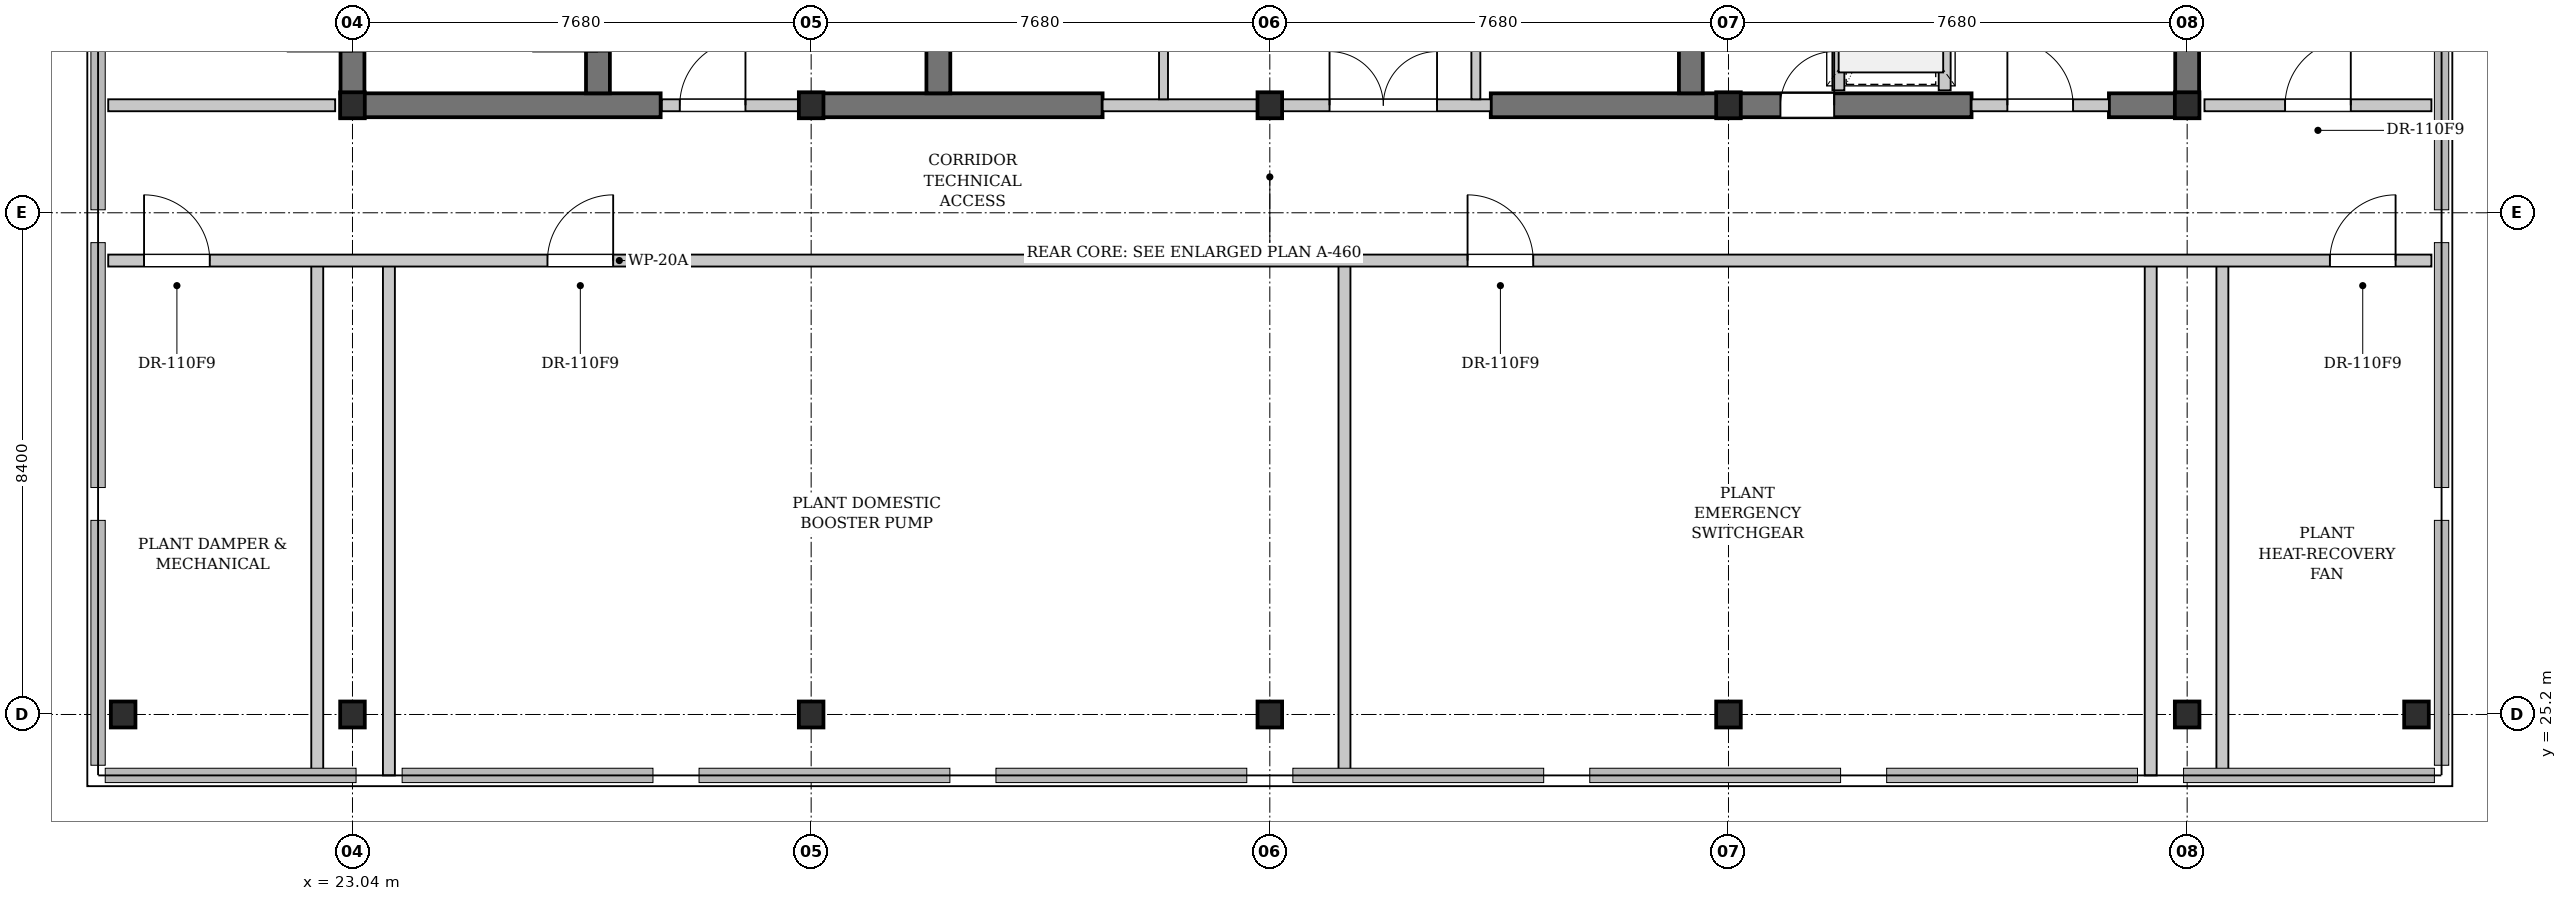
"""IFC4 building model, lengths in metres.
Left out: names, types, materials, properties, quantities, classifications, styles, units other than length and angle.
Written with IfcOpenShell. Run it as: python <this file> out.ifc"""

import sys

from ifc_helpers import new_model, si_unit, direction, frame, frame_2d, origin, origin_2d, place, context, subcontext, project, spatial, rectangle, i_section, extrude, element, fill, save


model = new_model("IFC4")
c1 = context("Model", 3, precision=1e-05, world=origin(), true_north=direction((0.0, 1.0)))
c2 = subcontext(c1, "Body", "Model", "MODEL_VIEW")
j1 = project(units=[si_unit("LENGTHUNIT", "METRE"), si_unit("PLANEANGLEUNIT", "RADIAN")], contexts=[c1])
p1 = place(None, origin())
s1 = spatial("IfcSite", under=j1, at=p1, CompositionType="ELEMENT")
p2 = place(p1, origin())
s2 = spatial("IfcBuilding", under=s1, at=p2, CompositionType="ELEMENT")
p3 = place(p2, frame((0.0, 0.0, 255.2)))
s3 = spatial("IfcBuildingStorey", under=s2, at=p3, CompositionType="ELEMENT", Elevation=255.2)
p4 = place(p3, frame((22.84, 35.4, 0.0), z_axis=(0.0, 0.0, 1.0), x_axis=(1.0, 0.0, 0.0)))
e1 = element("IfcWall", 1, at=p4, inside=s3, PredefinedType="SHEAR", context=c2, shape_type="SweptSolid", body=[
    extrude(rectangle(XDim=5.36, YDim=0.4, at=frame_2d((2.68, 0.0))), origin(), (0.0, 0.0, 1.0), 3.48),
])
p5 = place(p3, frame((30.72, 35.4, 0.0), z_axis=(0.0, 0.0, 1.0), x_axis=(1.0, 0.0, 0.0)))
e2 = element("IfcWall", 2, at=p5, inside=s3, PredefinedType="SHEAR", context=c2, shape_type="SweptSolid", body=[
    extrude(rectangle(XDim=4.88, YDim=0.4, at=frame_2d((2.44, 0.0))), origin(), (0.0, 0.0, 1.0), 3.48),
])
p6 = place(p3, frame((42.1, 35.4, 0.0), z_axis=(0.0, 0.0, 1.0), x_axis=(1.0, 0.0, 0.0)))
e3 = element("IfcWall", 3, at=p6, inside=s3, PredefinedType="SHEAR", context=c2, shape_type="SweptSolid", body=[
    extrude(rectangle(XDim=8.05, YDim=0.4, at=frame_2d((4.025, 0.0))), origin(), (0.0, 0.0, 1.0), 3.48),
])
p7 = place(p6, frame((4.85, 0.0, 0.0)))
e4 = element("IfcOpeningElement", 4, at=p7, cuts=e3, PredefinedType="OPENING", context=c2, shape_type="SweptSolid", body=[
    extrude(rectangle(XDim=0.9, YDim=2.15, at=frame_2d((0.45, 1.075))), frame((0.0, 0.21, 0.0), z_axis=(0.0, -1.0, 0.0), x_axis=(1.0, 0.0, 0.0)), (0.0, 0.0, 1.0), 0.42),
])
p8 = place(p3, frame((52.45, 35.4, 0.0), z_axis=(0.0, 0.0, 1.0), x_axis=(1.0, 0.0, 0.0)))
e5 = element("IfcWall", 5, at=p8, inside=s3, PredefinedType="SHEAR", context=c2, shape_type="SweptSolid", body=[
    extrude(rectangle(XDim=1.51, YDim=0.4, at=frame_2d((0.755, 0.0))), origin(), (0.0, 0.0, 1.0), 3.48),
])
p9 = place(p3, frame((23.04, 35.6, 0.0), z_axis=(0.0, 0.0, 1.0), x_axis=(0.0, 1.0, 0.0)))
e6 = element("IfcWall", 6, at=p9, inside=s3, PredefinedType="SHEAR", context=c2, shape_type="SweptSolid", body=[
    extrude(rectangle(XDim=10.4, YDim=0.4, at=frame_2d((5.2, 0.0))), origin(), (0.0, 0.0, 1.0), 3.48),
])
p10 = place(p9, frame((0.7, 0.0, 0.0)))
e7 = element("IfcOpeningElement", 7, at=p10, cuts=e6, PredefinedType="OPENING", context=c2, shape_type="SweptSolid", body=[
    extrude(rectangle(XDim=1.1, YDim=2.15, at=frame_2d((0.55, 1.075))), frame((0.0, 0.21, 0.0), z_axis=(0.0, -1.0, 0.0), x_axis=(1.0, 0.0, 0.0)), (0.0, 0.0, 1.0), 0.42),
])
p11 = place(p3, frame((27.15, 35.6, 0.0), z_axis=(0.0, 0.0, 1.0), x_axis=(0.0, 1.0, 0.0)))
e8 = element("IfcWall", 8, at=p11, inside=s3, PredefinedType="SHEAR", context=c2, shape_type="SweptSolid", body=[
    extrude(rectangle(XDim=10.4, YDim=0.4, at=frame_2d((5.2, 0.0))), origin(), (0.0, 0.0, 1.0), 3.48),
])
p12 = place(p11, frame((0.7, 0.0, 0.0)))
e9 = element("IfcOpeningElement", 9, at=p12, cuts=e8, PredefinedType="OPENING", context=c2, shape_type="SweptSolid", body=[
    extrude(rectangle(XDim=1.1, YDim=2.15, at=frame_2d((0.55, 1.075))), frame((0.0, 0.21, 0.0), z_axis=(0.0, -1.0, 0.0), x_axis=(1.0, 0.0, 0.0)), (0.0, 0.0, 1.0), 0.42),
])
for number, where, z_axis, x_axis in (
    (10, (32.85, 35.6, 0.0), (0.0, 0.0, 1.0), (0.0, 1.0, 0.0)),
    (11, (45.45, 35.6, 0.0), (0.0, 0.0, 1.0), (0.0, 1.0, 0.0)),
    (12, (53.76, 35.6, 0.0), (0.0, 0.0, 1.0), (0.0, 1.0, 0.0)),
):
    element("IfcWall", number, at=place(p3, frame(where, z_axis=z_axis, x_axis=x_axis)), inside=s3, PredefinedType="SHEAR", context=c2, shape_type="SweptSolid", body=[
        extrude(rectangle(XDim=10.4, YDim=0.4, at=frame_2d((5.2, 0.0))), origin(), (0.0, 0.0, 1.0), 3.48),
    ])
for number, where, z_axis, x_axis in (
    (13, (23.04, 35.4, 0.0), (0.0, 0.0, 1.0), (1.0, 0.0, 0.0)),
    (14, (23.04, 25.2, 0.0), (0.0, 0.0, 1.0), (1.0, 0.0, 0.0)),
    (15, (30.72, 35.4, 0.0), (0.0, 0.0, 1.0), (1.0, 0.0, 0.0)),
    (16, (30.72, 25.2, 0.0), (0.0, 0.0, 1.0), (1.0, 0.0, 0.0)),
    (17, (38.4, 35.4, 0.0), (0.0, 0.0, 1.0), (1.0, 0.0, 0.0)),
    (18, (38.4, 25.2, 0.0), (0.0, 0.0, 1.0), (1.0, 0.0, 0.0)),
    (19, (46.08, 35.4, 0.0), (0.0, 0.0, 1.0), (1.0, 0.0, 0.0)),
    (20, (46.08, 25.2, 0.0), (0.0, 0.0, 1.0), (1.0, 0.0, 0.0)),
    (21, (53.76, 35.4, 0.0), (0.0, 0.0, 1.0), (1.0, 0.0, 0.0)),
    (22, (53.76, 25.2, 0.0), (0.0, 0.0, 1.0), (1.0, 0.0, 0.0)),
    (23, (19.2, 25.2, 0.0), (0.0, 0.0, 1.0), (1.0, 0.0, 0.0)),
    (24, (57.6, 25.2, 0.0), (0.0, 0.0, 1.0), (1.0, 0.0, 0.0)),
):
    element("IfcColumn", number, at=place(p3, frame(where, z_axis=z_axis, x_axis=x_axis)), inside=s3, PredefinedType="COLUMN", context=c2, shape_type="SweptSolid", body=[
        extrude(i_section(OverallWidth=0.412, OverallDepth=0.435, WebThickness=0.036, FlangeThickness=0.058, FilletRadius=0.015, at=origin_2d()), origin(), (0.0, 0.0, 1.0), 3.9),
    ])
p13 = place(p3, frame((28.22, 35.4, 0.0), z_axis=(0.0, 0.0, 1.0), x_axis=(1.0, 0.0, 0.0)))
e25 = element("IfcWall", 25, at=p13, inside=s3, PredefinedType="PARTITIONING", context=c2, shape_type="SweptSolid", body=[
    extrude(rectangle(XDim=2.5, YDim=0.2, at=frame_2d((1.25, 0.0))), origin(), (0.0, 0.0, 1.0), 2.661),
])
p14 = place(p13, frame((0.3, 0.0, 0.0)))
e26 = element("IfcOpeningElement", 26, at=p14, cuts=e25, PredefinedType="OPENING", context=c2, shape_type="SweptSolid", body=[
    extrude(rectangle(XDim=1.1, YDim=2.15, at=frame_2d((0.55, 1.075))), frame((0.0, 0.11, 0.0), z_axis=(0.0, -1.0, 0.0), x_axis=(1.0, 0.0, 0.0)), (0.0, 0.0, 1.0), 0.22),
])
p15 = place(p3, frame((35.6, 35.4, 0.0), z_axis=(0.0, 0.0, 1.0), x_axis=(1.0, 0.0, 0.0)))
e27 = element("IfcWall", 27, at=p15, inside=s3, PredefinedType="PARTITIONING", context=c2, shape_type="SweptSolid", body=[
    extrude(rectangle(XDim=6.5, YDim=0.2, at=frame_2d((3.25, 0.0))), origin(), (0.0, 0.0, 1.0), 2.275),
])
p16 = place(p15, frame((3.8, 0.0, 0.0)))
e28 = element("IfcOpeningElement", 28, at=p16, cuts=e27, PredefinedType="OPENING", context=c2, shape_type="SweptSolid", body=[
    extrude(rectangle(XDim=1.8, YDim=2.3, at=frame_2d((0.9, 1.15))), frame((0.0, 0.11, 0.0), z_axis=(0.0, -1.0, 0.0), x_axis=(1.0, 0.0, 0.0)), (0.0, 0.0, 1.0), 0.22),
])
p17 = place(p3, frame((36.62, 35.5, 0.0), z_axis=(0.0, 0.0, 1.0), x_axis=(0.0, 1.0, 0.0)))
e29 = element("IfcWall", 29, at=p17, inside=s3, PredefinedType="PARTITIONING", context=c2, shape_type="SweptSolid", body=[
    extrude(rectangle(XDim=10.42, YDim=0.15, at=frame_2d((5.21, 0.0))), origin(), (0.0, 0.0, 1.0), 3.48),
])
p18 = place(p17, frame((3.92, 0.0, 0.0)))
e30 = element("IfcOpeningElement", 30, at=p18, cuts=e29, PredefinedType="OPENING", context=c2, shape_type="SweptSolid", body=[
    extrude(rectangle(XDim=0.9, YDim=2.15, at=frame_2d((0.45, 1.075))), frame((0.0, 0.085, 0.0), z_axis=(0.0, -1.0, 0.0), x_axis=(1.0, 0.0, 0.0)), (0.0, 0.0, 1.0), 0.17),
])
p19 = place(p17, frame((5.85, 0.0, 0.0)))
e31 = element("IfcOpeningElement", 31, at=p19, cuts=e29, PredefinedType="OPENING", context=c2, shape_type="SweptSolid", body=[
    extrude(rectangle(XDim=0.9, YDim=2.15, at=frame_2d((0.45, 1.075))), frame((0.0, 0.085, 0.0), z_axis=(0.0, -1.0, 0.0), x_axis=(1.0, 0.0, 0.0)), (0.0, 0.0, 1.0), 0.17),
])
p20 = place(p3, frame((41.85, 35.5, 0.0), z_axis=(0.0, 0.0, 1.0), x_axis=(0.0, 1.0, 0.0)))
e32 = element("IfcWall", 32, at=p20, inside=s3, PredefinedType="PARTITIONING", context=c2, shape_type="SweptSolid", body=[
    extrude(rectangle(XDim=10.42, YDim=0.15, at=frame_2d((5.21, 0.0))), origin(), (0.0, 0.0, 1.0), 3.48),
])
p21 = place(p20, frame((3.92, 0.0, 0.0)))
e33 = element("IfcOpeningElement", 33, at=p21, cuts=e32, PredefinedType="OPENING", context=c2, shape_type="SweptSolid", body=[
    extrude(rectangle(XDim=0.9, YDim=2.15, at=frame_2d((0.45, 1.075))), frame((0.0, 0.085, 0.0), z_axis=(0.0, -1.0, 0.0), x_axis=(1.0, 0.0, 0.0)), (0.0, 0.0, 1.0), 0.17),
])
p22 = place(p20, frame((5.85, 0.0, 0.0)))
e34 = element("IfcOpeningElement", 34, at=p22, cuts=e32, PredefinedType="OPENING", context=c2, shape_type="SweptSolid", body=[
    extrude(rectangle(XDim=0.9, YDim=2.15, at=frame_2d((0.45, 1.075))), frame((0.0, 0.085, 0.0), z_axis=(0.0, -1.0, 0.0), x_axis=(1.0, 0.0, 0.0)), (0.0, 0.0, 1.0), 0.17),
])
p23 = place(p3, frame((50.15, 35.4, 0.0), z_axis=(0.0, 0.0, 1.0), x_axis=(1.0, 0.0, 0.0)))
e35 = element("IfcWall", 35, at=p23, inside=s3, PredefinedType="PARTITIONING", context=c2, shape_type="SweptSolid", body=[
    extrude(rectangle(XDim=2.3, YDim=0.2, at=frame_2d((1.15, 0.0))), origin(), (0.0, 0.0, 1.0), 2.661),
])
p24 = place(p23, frame((0.6, 0.0, 0.0)))
e36 = element("IfcOpeningElement", 36, at=p24, cuts=e35, PredefinedType="OPENING", context=c2, shape_type="SweptSolid", body=[
    extrude(rectangle(XDim=1.1, YDim=2.15, at=frame_2d((0.55, 1.075))), frame((0.0, 0.11, 0.0), z_axis=(0.0, -1.0, 0.0), x_axis=(1.0, 0.0, 0.0)), (0.0, 0.0, 1.0), 0.22),
])
p25 = place(p3, frame((49.7, 35.65, 0.0), z_axis=(0.0, 0.0, 1.0), x_axis=(0.0, 1.0, 0.0)))
e37 = element("IfcWall", 37, at=p25, inside=s3, PredefinedType="PARTITIONING", context=c2, shape_type="SweptSolid", body=[
    extrude(rectangle(XDim=3.15, YDim=0.2, at=frame_2d((1.575, 0.0))), origin(), (0.0, 0.0, 1.0), 3.48),
])
p26 = place(p25, frame((0.85, 0.0, 0.0)))
e38 = element("IfcOpeningElement", 38, at=p26, cuts=e37, PredefinedType="OPENING", context=c2, shape_type="SweptSolid", body=[
    extrude(rectangle(XDim=1.2, YDim=2.2, at=frame_2d((0.6, 1.1))), frame((0.0, 0.11, 0.0), z_axis=(0.0, -1.0, 0.0), x_axis=(1.0, 0.0, 0.0)), (0.0, 0.0, 1.0), 0.22),
])
p27 = place(p3, frame((47.92, 35.65, 0.0), z_axis=(0.0, 0.0, 1.0), x_axis=(0.0, 1.0, 0.0)))
e39 = element("IfcWall", 39, at=p27, inside=s3, PredefinedType="PARTITIONING", context=c2, shape_type="SweptSolid", body=[
    extrude(rectangle(XDim=3.15, YDim=0.2, at=frame_2d((1.575, 0.0))), origin(), (0.0, 0.0, 1.0), 3.48),
])
p28 = place(p3, frame((18.95, 35.4, 0.0), z_axis=(0.0, 0.0, 1.0), x_axis=(1.0, 0.0, 0.0)))
e40 = element("IfcWall", 40, at=p28, inside=s3, PredefinedType="PARTITIONING", context=c2, shape_type="SweptSolid", body=[
    extrude(rectangle(XDim=3.8, YDim=0.2, at=frame_2d((1.9, 0.0))), origin(), (0.0, 0.0, 1.0), 3.48),
])
p29 = place(p3, frame((54.05, 35.4, 0.0), z_axis=(0.0, 0.0, 1.0), x_axis=(1.0, 0.0, 0.0)))
e41 = element("IfcWall", 41, at=p29, inside=s3, PredefinedType="PARTITIONING", context=c2, shape_type="SweptSolid", body=[
    extrude(rectangle(XDim=3.8, YDim=0.2, at=frame_2d((1.9, 0.0))), origin(), (0.0, 0.0, 1.0), 3.48),
])
p30 = place(p29, frame((1.35, 0.0, 0.0)))
e42 = element("IfcOpeningElement", 42, at=p30, cuts=e41, PredefinedType="OPENING", context=c2, shape_type="SweptSolid", body=[
    extrude(rectangle(XDim=1.1, YDim=2.15, at=frame_2d((0.55, 1.075))), frame((0.0, 0.11, 0.0), z_axis=(0.0, -1.0, 0.0), x_axis=(1.0, 0.0, 0.0)), (0.0, 0.0, 1.0), 0.22),
])
p31 = place(p3, frame((22.45, 24.18, 0.0), z_axis=(0.0, 0.0, 1.0), x_axis=(0.0, 1.0, 0.0)))
e43 = element("IfcWall", 43, at=p31, inside=s3, PredefinedType="PARTITIONING", context=c2, shape_type="SweptSolid", body=[
    extrude(rectangle(XDim=8.62, YDim=0.2, at=frame_2d((4.31, 0.0))), origin(), (0.0, 0.0, 1.0), 2.275),
])
for number, where, z_axis, x_axis in (
    (44, (23.65, 24.18, 0.0), (0.0, 0.0, 1.0), (0.0, 1.0, 0.0)),
    (45, (39.65, 24.18, 0.0), (0.0, 0.0, 1.0), (0.0, 1.0, 0.0)),
    (46, (53.15, 24.18, 0.0), (0.0, 0.0, 1.0), (0.0, 1.0, 0.0)),
    (47, (54.35, 24.18, 0.0), (0.0, 0.0, 1.0), (0.0, 1.0, 0.0)),
):
    element("IfcWall", number, at=place(p3, frame(where, z_axis=z_axis, x_axis=x_axis)), inside=s3, PredefinedType="PARTITIONING", context=c2, shape_type="SweptSolid", body=[
        extrude(rectangle(XDim=8.62, YDim=0.2, at=frame_2d((4.31, 0.0))), origin(), (0.0, 0.0, 1.0), 3.48),
    ])
p32 = place(p3, frame((18.95, 32.8, 0.0), z_axis=(0.0, 0.0, 1.0), x_axis=(1.0, 0.0, 0.0)))
e48 = element("IfcWall", 48, at=p32, inside=s3, PredefinedType="PARTITIONING", context=c2, shape_type="SweptSolid", body=[
    extrude(rectangle(XDim=38.9, YDim=0.2, at=frame_2d((19.45, 0.0))), origin(), (0.0, 0.0, 1.0), 2.275),
])
p33 = place(p32, frame((0.6, 0.0, 0.0)))
e49 = element("IfcOpeningElement", 49, at=p33, cuts=e48, PredefinedType="OPENING", context=c2, shape_type="SweptSolid", body=[
    extrude(rectangle(XDim=1.1, YDim=2.15, at=frame_2d((0.55, 1.075))), frame((0.0, 0.11, 0.0), z_axis=(0.0, -1.0, 0.0), x_axis=(1.0, 0.0, 0.0)), (0.0, 0.0, 1.0), 0.22),
])
p34 = place(p32, frame((7.355, 0.0, 0.0)))
e50 = element("IfcOpeningElement", 50, at=p34, cuts=e48, PredefinedType="OPENING", context=c2, shape_type="SweptSolid", body=[
    extrude(rectangle(XDim=1.1, YDim=2.15, at=frame_2d((0.55, 1.075))), frame((0.0, 0.11, 0.0), z_axis=(0.0, -1.0, 0.0), x_axis=(1.0, 0.0, 0.0)), (0.0, 0.0, 1.0), 0.22),
])
p35 = place(p32, frame((22.761, 0.0, 0.0)))
e51 = element("IfcOpeningElement", 51, at=p35, cuts=e48, PredefinedType="OPENING", context=c2, shape_type="SweptSolid", body=[
    extrude(rectangle(XDim=1.1, YDim=2.15, at=frame_2d((0.55, 1.075))), frame((0.0, 0.11, 0.0), z_axis=(0.0, -1.0, 0.0), x_axis=(1.0, 0.0, 0.0)), (0.0, 0.0, 1.0), 0.22),
])
p36 = place(p32, frame((37.2, 0.0, 0.0)))
e52 = element("IfcOpeningElement", 52, at=p36, cuts=e48, PredefinedType="OPENING", context=c2, shape_type="SweptSolid", body=[
    extrude(rectangle(XDim=1.1, YDim=2.15, at=frame_2d((0.55, 1.075))), frame((0.0, 0.11, 0.0), z_axis=(0.0, -1.0, 0.0), x_axis=(1.0, 0.0, 0.0)), (0.0, 0.0, 1.0), 0.22),
])
p37 = place(p14, origin())
e53 = element("IfcDoor", 53, at=p37, inside=s3, OperationType="SINGLE_SWING_RIGHT", PredefinedType="DOOR", context=c2, shape_type="SweptSolid", body=[
    extrude(rectangle(XDim=1.1, YDim=2.15, at=frame_2d((0.55, 1.075))), frame((0.0, 0.025, 0.0), z_axis=(0.0, -1.0, 0.0), x_axis=(1.0, 0.0, 0.0)), (0.0, 0.0, 1.0), 0.05),
])
fill(e26, e53)
p38 = place(p16, origin())
e54 = element("IfcDoor", 54, at=p38, inside=s3, OperationType="DOUBLE_DOOR_SINGLE_SWING", PredefinedType="DOOR", context=c2, shape_type="SweptSolid", body=[
    extrude(rectangle(XDim=1.8, YDim=2.3, at=frame_2d((0.9, 1.15))), frame((0.0, 0.025, 0.0), z_axis=(0.0, -1.0, 0.0), x_axis=(1.0, 0.0, 0.0)), (0.0, 0.0, 1.0), 0.05),
])
fill(e28, e54)
p39 = place(p24, origin())
e55 = element("IfcDoor", 55, at=p39, inside=s3, OperationType="SINGLE_SWING_LEFT", PredefinedType="DOOR", context=c2, shape_type="SweptSolid", body=[
    extrude(rectangle(XDim=1.1, YDim=2.15, at=frame_2d((0.55, 1.075))), frame((0.0, 0.025, 0.0), z_axis=(0.0, -1.0, 0.0), x_axis=(1.0, 0.0, 0.0)), (0.0, 0.0, 1.0), 0.05),
])
fill(e36, e55)
p40 = place(p30, origin())
e56 = element("IfcDoor", 56, at=p40, inside=s3, OperationType="SINGLE_SWING_RIGHT", PredefinedType="DOOR", context=c2, shape_type="SweptSolid", body=[
    extrude(rectangle(XDim=1.1, YDim=2.15, at=frame_2d((0.55, 1.075))), frame((0.0, 0.025, 0.0), z_axis=(0.0, -1.0, 0.0), x_axis=(1.0, 0.0, 0.0)), (0.0, 0.0, 1.0), 0.05),
])
fill(e42, e56)
p41 = place(p33, origin())
e57 = element("IfcDoor", 57, at=p41, inside=s3, OperationType="SINGLE_SWING_LEFT", PredefinedType="DOOR", context=c2, shape_type="SweptSolid", body=[
    extrude(rectangle(XDim=1.1, YDim=2.15, at=frame_2d((0.55, 1.075))), frame((0.0, 0.025, 0.0), z_axis=(0.0, -1.0, 0.0), x_axis=(1.0, 0.0, 0.0)), (0.0, 0.0, 1.0), 0.05),
])
fill(e49, e57)
p42 = place(p34, origin())
e58 = element("IfcDoor", 58, at=p42, inside=s3, OperationType="SINGLE_SWING_RIGHT", PredefinedType="DOOR", context=c2, shape_type="SweptSolid", body=[
    extrude(rectangle(XDim=1.1, YDim=2.15, at=frame_2d((0.55, 1.075))), frame((0.0, 0.025, 0.0), z_axis=(0.0, -1.0, 0.0), x_axis=(1.0, 0.0, 0.0)), (0.0, 0.0, 1.0), 0.05),
])
fill(e50, e58)
p43 = place(p35, origin())
e59 = element("IfcDoor", 59, at=p43, inside=s3, OperationType="SINGLE_SWING_LEFT", PredefinedType="DOOR", context=c2, shape_type="SweptSolid", body=[
    extrude(rectangle(XDim=1.1, YDim=2.15, at=frame_2d((0.55, 1.075))), frame((0.0, 0.025, 0.0), z_axis=(0.0, -1.0, 0.0), x_axis=(1.0, 0.0, 0.0)), (0.0, 0.0, 1.0), 0.05),
])
fill(e51, e59)
p44 = place(p36, origin())
e60 = element("IfcDoor", 60, at=p44, inside=s3, OperationType="SINGLE_SWING_RIGHT", PredefinedType="DOOR", context=c2, shape_type="SweptSolid", body=[
    extrude(rectangle(XDim=1.1, YDim=2.15, at=frame_2d((0.55, 1.075))), frame((0.0, 0.025, 0.0), z_axis=(0.0, -1.0, 0.0), x_axis=(1.0, 0.0, 0.0)), (0.0, 0.0, 1.0), 0.05),
])
fill(e52, e60)
p45 = place(p7, origin())
e61 = element("IfcDoor", 61, at=p45, inside=s3, OperationType="SINGLE_SWING_RIGHT", PredefinedType="DOOR", context=c2, shape_type="SweptSolid", body=[
    extrude(rectangle(XDim=0.9, YDim=2.15, at=frame_2d((0.45, 1.075))), frame((0.0, 0.025, 0.0), z_axis=(0.0, -1.0, 0.0), x_axis=(1.0, 0.0, 0.0)), (0.0, 0.0, 1.0), 0.05),
])
fill(e4, e61)
save(model, sys.argv[1])
